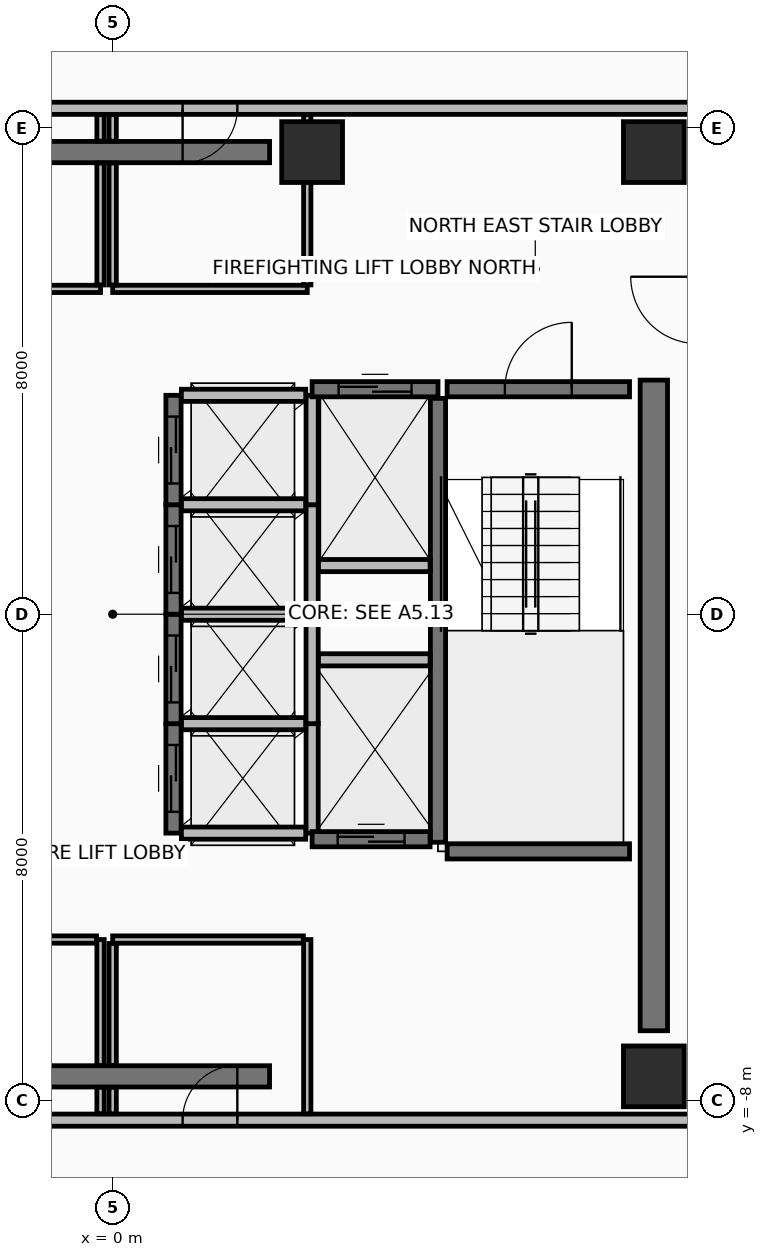
"""IFC4 building model, lengths in metres.
Left out: names, types, materials, properties, quantities, classifications, styles, units other than length and angle.
Written with IfcOpenShell. Run it as: python <this file> out.ifc"""

import sys

from ifc_helpers import new_model, si_unit, direction, frame, frame_2d, origin, origin_2d, place, context, subcontext, project, spatial, rectangle, extrude, element, fill, save


model = new_model("IFC4")
c1 = context("Model", 3, precision=1e-05, world=origin(), true_north=direction((0.0, 1.0)))
c2 = subcontext(c1, "Body", "Model", "MODEL_VIEW")
j1 = project(units=[si_unit("LENGTHUNIT", "METRE"), si_unit("PLANEANGLEUNIT", "RADIAN")], contexts=[c1])
p1 = place(None, origin())
s1 = spatial("IfcSite", under=j1, at=p1, CompositionType="ELEMENT")
p2 = place(p1, origin())
s2 = spatial("IfcBuilding", under=s1, at=p2, CompositionType="ELEMENT")
p3 = place(p2, frame((0.0, 0.0, 287.05)))
s3 = spatial("IfcBuildingStorey", under=s2, at=p3, CompositionType="ELEMENT", Elevation=287.05)
for number, where, z_axis, x_axis in (
    (1, (8.9, -7.6, 0.0), (0.0, 0.0, 1.0), (1.0, 0.0, 0.0)),
    (2, (8.9, 7.6, 0.0), (0.0, 0.0, 1.0), (1.0, 0.0, 0.0)),
    (3, (3.28, 7.6, 0.0), (0.0, 0.0, 1.0), (1.0, 0.0, 0.0)),
):
    element("IfcColumn", number, at=place(p3, frame(where, z_axis=z_axis, x_axis=x_axis)), inside=s3, PredefinedType="COLUMN", context=c2, shape_type="SweptSolid", body=[
        extrude(rectangle(XDim=1.0, YDim=1.0, at=origin_2d()), origin(), (0.0, 0.0, 1.0), 3.65),
    ])
for number, where, z_axis, x_axis in (
    (4, (-2.8, -7.6, 0.0), (0.0, 0.0, 1.0), (1.0, 0.0, 0.0)),
    (5, (-2.8, 7.6, 0.0), (0.0, 0.0, 1.0), (1.0, 0.0, 0.0)),
):
    element("IfcWall", number, at=place(p3, frame(where, z_axis=z_axis, x_axis=x_axis)), inside=s3, PredefinedType="SHEAR", context=c2, shape_type="SweptSolid", body=[
        extrude(rectangle(XDim=5.38, YDim=0.35, at=frame_2d((2.69, 0.0))), origin(), (0.0, 0.0, 1.0), 3.465),
    ])
p4 = place(p3, frame((8.9, -6.85, 0.0), z_axis=(0.0, 0.0, 1.0), x_axis=(0.0, 1.0, 0.0)))
e6 = element("IfcWall", 6, at=p4, inside=s3, PredefinedType="SHEAR", context=c2, shape_type="SweptSolid", body=[
    extrude(rectangle(XDim=10.7, YDim=0.45, at=frame_2d((5.35, 0.0))), origin(), (0.0, 0.0, 1.0), 3.465),
])
p5 = place(p3, frame((-9.62, -8.32, 0.0), z_axis=(0.0, 0.0, 1.0), x_axis=(1.0, 0.0, 0.0)))
e7 = element("IfcWall", 7, at=p5, inside=s3, PredefinedType="PARTITIONING", context=c2, shape_type="SweptSolid", body=[
    extrude(rectangle(XDim=19.24, YDim=0.2, at=frame_2d((9.62, 0.0))), origin(), (0.0, 0.0, 1.0), 2.96),
])
p6 = place(p5, frame((7.37, 0.0, 0.0)))
e8 = element("IfcOpeningElement", 8, at=p6, cuts=e7, PredefinedType="OPENING", context=c2, shape_type="SweptSolid", body=[
    extrude(rectangle(XDim=0.9, YDim=2.1, at=frame_2d((0.45, 1.05))), frame((0.0, 0.11, 0.0), z_axis=(0.0, -1.0, 0.0), x_axis=(1.0, 0.0, 0.0)), (0.0, 0.0, 1.0), 0.22),
])
p7 = place(p5, frame((10.77, 0.0, 0.0)))
e9 = element("IfcOpeningElement", 9, at=p7, cuts=e7, PredefinedType="OPENING", context=c2, shape_type="SweptSolid", body=[
    extrude(rectangle(XDim=0.9, YDim=2.1, at=frame_2d((0.45, 1.05))), frame((0.0, 0.11, 0.0), z_axis=(0.0, -1.0, 0.0), x_axis=(1.0, 0.0, 0.0)), (0.0, 0.0, 1.0), 0.22),
])
p8 = place(p3, frame((9.62, 8.32, 0.0), z_axis=(0.0, 0.0, 1.0), x_axis=(-1.0, 0.0, 0.0)))
e10 = element("IfcWall", 10, at=p8, inside=s3, PredefinedType="PARTITIONING", context=c2, shape_type="SweptSolid", body=[
    extrude(rectangle(XDim=19.24, YDim=0.2, at=frame_2d((9.62, 0.0))), origin(), (0.0, 0.0, 1.0), 2.96),
])
p9 = place(p8, frame((10.97, 0.0, 0.0)))
e11 = element("IfcOpeningElement", 11, at=p9, cuts=e10, PredefinedType="OPENING", context=c2, shape_type="SweptSolid", body=[
    extrude(rectangle(XDim=0.9, YDim=2.1, at=frame_2d((0.45, 1.05))), frame((0.0, 0.11, 0.0), z_axis=(0.0, -1.0, 0.0), x_axis=(1.0, 0.0, 0.0)), (0.0, 0.0, 1.0), 0.22),
])
p10 = place(p8, frame((7.57, 0.0, 0.0)))
e12 = element("IfcOpeningElement", 12, at=p10, cuts=e10, PredefinedType="OPENING", context=c2, shape_type="SweptSolid", body=[
    extrude(rectangle(XDim=0.9, YDim=2.1, at=frame_2d((0.45, 1.05))), frame((0.0, 0.11, 0.0), z_axis=(0.0, -1.0, 0.0), x_axis=(1.0, 0.0, 0.0)), (0.0, 0.0, 1.0), 0.22),
])
p11 = place(p8, frame((15.02, 0.0, 0.0)))
e13 = element("IfcOpeningElement", 13, at=p11, cuts=e10, PredefinedType="OPENING", context=c2, shape_type="SweptSolid", body=[
    extrude(rectangle(XDim=0.9, YDim=2.1, at=frame_2d((0.45, 1.05))), frame((0.0, 0.11, 0.0), z_axis=(0.0, -1.0, 0.0), x_axis=(1.0, 0.0, 0.0)), (0.0, 0.0, 1.0), 0.22),
])
p12 = place(p3, frame((5.35, -3.75, 0.0), z_axis=(0.0, 0.0, 1.0), x_axis=(0.0, 1.0, 0.0)))
e14 = element("IfcWall", 14, at=p12, inside=s3, PredefinedType="SHEAR", context=c2, shape_type="SweptSolid", body=[
    extrude(rectangle(XDim=7.3, YDim=0.25, at=frame_2d((3.65, 0.0))), origin(), (0.0, 0.0, 1.0), 3.465),
])
p13 = place(p3, frame((5.5, 3.7, 0.0), z_axis=(0.0, 0.0, 1.0), x_axis=(1.0, 0.0, 0.0)))
e15 = element("IfcWall", 15, at=p13, inside=s3, PredefinedType="SHEAR", context=c2, shape_type="SweptSolid", body=[
    extrude(rectangle(XDim=3.0, YDim=0.25, at=frame_2d((1.5, 0.0))), origin(), (0.0, 0.0, 1.0), 3.465),
])
p14 = place(p13, frame((0.95, 0.0, 0.0)))
e16 = element("IfcOpeningElement", 16, at=p14, cuts=e15, PredefinedType="OPENING", context=c2, shape_type="SweptSolid", body=[
    extrude(rectangle(XDim=1.1, YDim=2.15, at=frame_2d((0.55, 1.075))), frame((0.0, 0.135, 0.0), z_axis=(0.0, -1.0, 0.0), x_axis=(1.0, 0.0, 0.0)), (0.0, 0.0, 1.0), 0.27),
])
p15 = place(p3, frame((5.5, -3.9, 0.0), z_axis=(0.0, 0.0, 1.0), x_axis=(1.0, 0.0, 0.0)))
e17 = element("IfcWall", 17, at=p15, inside=s3, PredefinedType="SHEAR", context=c2, shape_type="SweptSolid", body=[
    extrude(rectangle(XDim=3.0, YDim=0.25, at=frame_2d((1.5, 0.0))), origin(), (0.0, 0.0, 1.0), 3.465),
])
p16 = place(p3, frame((1.0, -3.6, 0.0), z_axis=(0.0, 0.0, 1.0), x_axis=(0.0, 1.0, 0.0)))
e18 = element("IfcWall", 18, at=p16, inside=s3, PredefinedType="SHEAR", context=c2, shape_type="SweptSolid", body=[
    extrude(rectangle(XDim=1.8, YDim=0.25, at=frame_2d((0.9, 0.0))), origin(), (0.0, 0.0, 1.0), 3.465),
])
p17 = place(p16, frame((0.35, 0.0, 0.0)))
e19 = element("IfcOpeningElement", 19, at=p17, cuts=e18, PredefinedType="OPENING", context=c2, shape_type="SweptSolid", body=[
    extrude(rectangle(XDim=1.1, YDim=2.2, at=frame_2d((0.55, 1.1))), frame((0.0, 0.135, 0.0), z_axis=(0.0, -1.0, 0.0), x_axis=(1.0, 0.0, 0.0)), (0.0, 0.0, 1.0), 0.27),
])
p18 = place(p3, frame((3.28, -3.6, 0.0), z_axis=(0.0, 0.0, 1.0), x_axis=(0.0, 1.0, 0.0)))
e20 = element("IfcWall", 20, at=p18, inside=s3, PredefinedType="PARTITIONING", context=c2, shape_type="SweptSolid", body=[
    extrude(rectangle(XDim=1.8, YDim=0.2, at=frame_2d((0.9, 0.0))), origin(), (0.0, 0.0, 1.0), 3.465),
])
for number, where, z_axis, x_axis in (
    (21, (1.13, -3.6, 0.0), (0.0, 0.0, 1.0), (1.0, 0.0, 0.0)),
    (22, (1.13, -1.8, 0.0), (0.0, 0.0, 1.0), (1.0, 0.0, 0.0)),
):
    element("IfcWall", number, at=place(p3, frame(where, z_axis=z_axis, x_axis=x_axis)), inside=s3, PredefinedType="PARTITIONING", context=c2, shape_type="SweptSolid", body=[
        extrude(rectangle(XDim=2.045, YDim=0.2, at=frame_2d((1.022, 0.0))), origin(), (0.0, 0.0, 1.0), 3.465),
    ])
p19 = place(p3, frame((1.0, -1.8, 0.0), z_axis=(0.0, 0.0, 1.0), x_axis=(0.0, 1.0, 0.0)))
e23 = element("IfcWall", 23, at=p19, inside=s3, PredefinedType="SHEAR", context=c2, shape_type="SweptSolid", body=[
    extrude(rectangle(XDim=1.8, YDim=0.25, at=frame_2d((0.9, 0.0))), origin(), (0.0, 0.0, 1.0), 3.465),
])
p20 = place(p19, frame((0.35, 0.0, 0.0)))
e24 = element("IfcOpeningElement", 24, at=p20, cuts=e23, PredefinedType="OPENING", context=c2, shape_type="SweptSolid", body=[
    extrude(rectangle(XDim=1.1, YDim=2.2, at=frame_2d((0.55, 1.1))), frame((0.0, 0.135, 0.0), z_axis=(0.0, -1.0, 0.0), x_axis=(1.0, 0.0, 0.0)), (0.0, 0.0, 1.0), 0.27),
])
p21 = place(p3, frame((3.28, -1.8, 0.0), z_axis=(0.0, 0.0, 1.0), x_axis=(0.0, 1.0, 0.0)))
e25 = element("IfcWall", 25, at=p21, inside=s3, PredefinedType="PARTITIONING", context=c2, shape_type="SweptSolid", body=[
    extrude(rectangle(XDim=1.8, YDim=0.2, at=frame_2d((0.9, 0.0))), origin(), (0.0, 0.0, 1.0), 3.465),
])
p22 = place(p3, frame((1.13, 0.0, 0.0), z_axis=(0.0, 0.0, 1.0), x_axis=(1.0, 0.0, 0.0)))
e26 = element("IfcWall", 26, at=p22, inside=s3, PredefinedType="PARTITIONING", context=c2, shape_type="SweptSolid", body=[
    extrude(rectangle(XDim=2.045, YDim=0.2, at=frame_2d((1.022, 0.0))), origin(), (0.0, 0.0, 1.0), 3.465),
])
p23 = place(p3, frame((1.0, 0.0, 0.0), z_axis=(0.0, 0.0, 1.0), x_axis=(0.0, 1.0, 0.0)))
e27 = element("IfcWall", 27, at=p23, inside=s3, PredefinedType="SHEAR", context=c2, shape_type="SweptSolid", body=[
    extrude(rectangle(XDim=1.8, YDim=0.25, at=frame_2d((0.9, 0.0))), origin(), (0.0, 0.0, 1.0), 3.465),
])
p24 = place(p23, frame((0.35, 0.0, 0.0)))
e28 = element("IfcOpeningElement", 28, at=p24, cuts=e27, PredefinedType="OPENING", context=c2, shape_type="SweptSolid", body=[
    extrude(rectangle(XDim=1.1, YDim=2.2, at=frame_2d((0.55, 1.1))), frame((0.0, 0.135, 0.0), z_axis=(0.0, -1.0, 0.0), x_axis=(1.0, 0.0, 0.0)), (0.0, 0.0, 1.0), 0.27),
])
p25 = place(p3, frame((3.28, 0.0, 0.0), z_axis=(0.0, 0.0, 1.0), x_axis=(0.0, 1.0, 0.0)))
e29 = element("IfcWall", 29, at=p25, inside=s3, PredefinedType="PARTITIONING", context=c2, shape_type="SweptSolid", body=[
    extrude(rectangle(XDim=1.8, YDim=0.2, at=frame_2d((0.9, 0.0))), origin(), (0.0, 0.0, 1.0), 3.465),
])
p26 = place(p3, frame((1.13, 1.8, 0.0), z_axis=(0.0, 0.0, 1.0), x_axis=(1.0, 0.0, 0.0)))
e30 = element("IfcWall", 30, at=p26, inside=s3, PredefinedType="PARTITIONING", context=c2, shape_type="SweptSolid", body=[
    extrude(rectangle(XDim=2.045, YDim=0.2, at=frame_2d((1.022, 0.0))), origin(), (0.0, 0.0, 1.0), 3.465),
])
p27 = place(p3, frame((1.0, 1.8, 0.0), z_axis=(0.0, 0.0, 1.0), x_axis=(0.0, 1.0, 0.0)))
e31 = element("IfcWall", 31, at=p27, inside=s3, PredefinedType="SHEAR", context=c2, shape_type="SweptSolid", body=[
    extrude(rectangle(XDim=1.8, YDim=0.25, at=frame_2d((0.9, 0.0))), origin(), (0.0, 0.0, 1.0), 3.465),
])
p28 = place(p27, frame((0.35, 0.0, 0.0)))
e32 = element("IfcOpeningElement", 32, at=p28, cuts=e31, PredefinedType="OPENING", context=c2, shape_type="SweptSolid", body=[
    extrude(rectangle(XDim=1.1, YDim=2.2, at=frame_2d((0.55, 1.1))), frame((0.0, 0.135, 0.0), z_axis=(0.0, -1.0, 0.0), x_axis=(1.0, 0.0, 0.0)), (0.0, 0.0, 1.0), 0.27),
])
p29 = place(p3, frame((3.28, 1.8, 0.0), z_axis=(0.0, 0.0, 1.0), x_axis=(0.0, 1.0, 0.0)))
e33 = element("IfcWall", 33, at=p29, inside=s3, PredefinedType="PARTITIONING", context=c2, shape_type="SweptSolid", body=[
    extrude(rectangle(XDim=1.8, YDim=0.2, at=frame_2d((0.9, 0.0))), origin(), (0.0, 0.0, 1.0), 3.465),
])
p30 = place(p3, frame((1.13, 3.6, 0.0), z_axis=(0.0, 0.0, 1.0), x_axis=(1.0, 0.0, 0.0)))
e34 = element("IfcWall", 34, at=p30, inside=s3, PredefinedType="PARTITIONING", context=c2, shape_type="SweptSolid", body=[
    extrude(rectangle(XDim=2.045, YDim=0.2, at=frame_2d((1.022, 0.0))), origin(), (0.0, 0.0, 1.0), 2.76),
])
p31 = place(p3, frame((3.28, 3.7, 0.0), z_axis=(0.0, 0.0, 1.0), x_axis=(1.0, 0.0, 0.0)))
e35 = element("IfcWall", 35, at=p31, inside=s3, PredefinedType="SHEAR", context=c2, shape_type="SweptSolid", body=[
    extrude(rectangle(XDim=2.07, YDim=0.25, at=frame_2d((1.035, 0.0))), origin(), (0.0, 0.0, 1.0), 3.465),
])
p32 = place(p31, frame((0.435, 0.0, 0.0)))
e36 = element("IfcOpeningElement", 36, at=p32, cuts=e35, PredefinedType="OPENING", context=c2, shape_type="SweptSolid", body=[
    extrude(rectangle(XDim=1.2, YDim=2.2, at=frame_2d((0.6, 1.1))), frame((0.0, 0.135, 0.0), z_axis=(0.0, -1.0, 0.0), x_axis=(1.0, 0.0, 0.0)), (0.0, 0.0, 1.0), 0.27),
])
p33 = place(p3, frame((3.385, 0.8, 0.0), z_axis=(0.0, 0.0, 1.0), x_axis=(1.0, 0.0, 0.0)))
e37 = element("IfcWall", 37, at=p33, inside=s3, PredefinedType="PARTITIONING", context=c2, shape_type="SweptSolid", body=[
    extrude(rectangle(XDim=1.835, YDim=0.2, at=frame_2d((0.917, 0.0))), origin(), (0.0, 0.0, 1.0), 3.465),
])
p34 = place(p3, frame((3.28, -3.7, 0.0), z_axis=(0.0, 0.0, 1.0), x_axis=(1.0, 0.0, 0.0)))
e38 = element("IfcWall", 38, at=p34, inside=s3, PredefinedType="SHEAR", context=c2, shape_type="SweptSolid", body=[
    extrude(rectangle(XDim=1.94, YDim=0.25, at=frame_2d((0.97, 0.0))), origin(), (0.0, 0.0, 1.0), 3.465),
])
p35 = place(p34, frame((0.42, 0.0, 0.0)))
e39 = element("IfcOpeningElement", 39, at=p35, cuts=e38, PredefinedType="OPENING", context=c2, shape_type="SweptSolid", body=[
    extrude(rectangle(XDim=1.1, YDim=2.2, at=frame_2d((0.55, 1.1))), frame((0.0, 0.135, 0.0), z_axis=(0.0, -1.0, 0.0), x_axis=(1.0, 0.0, 0.0)), (0.0, 0.0, 1.0), 0.27),
])
p36 = place(p3, frame((3.385, -0.75, 0.0), z_axis=(0.0, 0.0, 1.0), x_axis=(1.0, 0.0, 0.0)))
e40 = element("IfcWall", 40, at=p36, inside=s3, PredefinedType="PARTITIONING", context=c2, shape_type="SweptSolid", body=[
    extrude(rectangle(XDim=1.835, YDim=0.2, at=frame_2d((0.917, 0.0))), origin(), (0.0, 0.0, 1.0), 3.465),
])
p37 = place(p3, frame((-0.2, -8.215, 0.0), z_axis=(0.0, 0.0, 1.0), x_axis=(0.0, 1.0, 0.0)))
e41 = element("IfcWall", 41, at=p37, inside=s3, PredefinedType="PARTITIONING", context=c2, shape_type="SweptSolid", body=[
    extrude(rectangle(XDim=0.435, YDim=0.12, at=frame_2d((0.218, 0.0))), origin(), (0.0, 0.0, 1.0), 2.76),
])
p38 = place(p3, frame((-0.2, -7.42, 0.0), z_axis=(0.0, 0.0, 1.0), x_axis=(0.0, 1.0, 0.0)))
e42 = element("IfcWall", 42, at=p38, inside=s3, PredefinedType="PARTITIONING", context=c2, shape_type="SweptSolid", body=[
    extrude(rectangle(XDim=2.07, YDim=0.12, at=frame_2d((1.035, 0.0))), origin(), (0.0, 0.0, 1.0), 2.76),
])
p39 = place(p3, frame((-0.265, -5.35, 0.0), z_axis=(0.0, 0.0, 1.0), x_axis=(-1.0, 0.0, 0.0)))
e43 = element("IfcWall", 43, at=p39, inside=s3, PredefinedType="PARTITIONING", context=c2, shape_type="SweptSolid", body=[
    extrude(rectangle(XDim=3.135, YDim=0.12, at=frame_2d((1.567, 0.0))), origin(), (0.0, 0.0, 1.0), 2.76),
])
p40 = place(p3, frame((3.2, -8.215, 0.0), z_axis=(0.0, 0.0, 1.0), x_axis=(0.0, 1.0, 0.0)))
e44 = element("IfcWall", 44, at=p40, inside=s3, PredefinedType="PARTITIONING", context=c2, shape_type="SweptSolid", body=[
    extrude(rectangle(XDim=2.865, YDim=0.12, at=frame_2d((1.433, 0.0))), origin(), (0.0, 0.0, 1.0), 2.76),
])
p41 = place(p3, frame((3.135, -5.35, 0.0), z_axis=(0.0, 0.0, 1.0), x_axis=(-1.0, 0.0, 0.0)))
e45 = element("IfcWall", 45, at=p41, inside=s3, PredefinedType="PARTITIONING", context=c2, shape_type="SweptSolid", body=[
    extrude(rectangle(XDim=3.135, YDim=0.12, at=frame_2d((1.567, 0.0))), origin(), (0.0, 0.0, 1.0), 3.465),
])
p42 = place(p3, frame((0.0, -5.415, 0.0), z_axis=(0.0, 0.0, 1.0), x_axis=(0.0, -1.0, 0.0)))
e46 = element("IfcWall", 46, at=p42, inside=s3, PredefinedType="PARTITIONING", context=c2, shape_type="SweptSolid", body=[
    extrude(rectangle(XDim=2.005, YDim=0.12, at=frame_2d((1.002, 0.0))), origin(), (0.0, 0.0, 1.0), 2.76),
])
p43 = place(p3, frame((0.0, -7.78, 0.0), z_axis=(0.0, 0.0, 1.0), x_axis=(0.0, -1.0, 0.0)))
e47 = element("IfcWall", 47, at=p43, inside=s3, PredefinedType="PARTITIONING", context=c2, shape_type="SweptSolid", body=[
    extrude(rectangle(XDim=0.435, YDim=0.12, at=frame_2d((0.218, 0.0))), origin(), (0.0, 0.0, 1.0), 2.76),
])
p44 = place(p3, frame((-3.4, 5.35, 0.0), z_axis=(0.0, 0.0, 1.0), x_axis=(1.0, 0.0, 0.0)))
e48 = element("IfcWall", 48, at=p44, inside=s3, PredefinedType="PARTITIONING", context=c2, shape_type="SweptSolid", body=[
    extrude(rectangle(XDim=3.2, YDim=0.12, at=frame_2d((1.6, 0.0))), origin(), (0.0, 0.0, 1.0), 3.465),
])
p45 = place(p3, frame((-0.2, 5.415, 0.0), z_axis=(0.0, 0.0, 1.0), x_axis=(0.0, 1.0, 0.0)))
e49 = element("IfcWall", 49, at=p45, inside=s3, PredefinedType="PARTITIONING", context=c2, shape_type="SweptSolid", body=[
    extrude(rectangle(XDim=2.005, YDim=0.12, at=frame_2d((1.002, 0.0))), origin(), (0.0, 0.0, 1.0), 2.76),
])
p46 = place(p3, frame((-0.2, 7.78, 0.0), z_axis=(0.0, 0.0, 1.0), x_axis=(0.0, 1.0, 0.0)))
e50 = element("IfcWall", 50, at=p46, inside=s3, PredefinedType="PARTITIONING", context=c2, shape_type="SweptSolid", body=[
    extrude(rectangle(XDim=0.435, YDim=0.12, at=frame_2d((0.218, 0.0))), origin(), (0.0, 0.0, 1.0), 2.76),
])
p47 = place(p3, frame((0.0, 5.35, 0.0), z_axis=(0.0, 0.0, 1.0), x_axis=(1.0, 0.0, 0.0)))
e51 = element("IfcWall", 51, at=p47, inside=s3, PredefinedType="PARTITIONING", context=c2, shape_type="SweptSolid", body=[
    extrude(rectangle(XDim=3.2, YDim=0.12, at=frame_2d((1.6, 0.0))), origin(), (0.0, 0.0, 1.0), 2.76),
])
p48 = place(p3, frame((3.2, 5.415, 0.0), z_axis=(0.0, 0.0, 1.0), x_axis=(0.0, 1.0, 0.0)))
e52 = element("IfcWall", 52, at=p48, inside=s3, PredefinedType="PARTITIONING", context=c2, shape_type="SweptSolid", body=[
    extrude(rectangle(XDim=2.8, YDim=0.12, at=frame_2d((1.4, 0.0))), origin(), (0.0, 0.0, 1.0), 2.76),
])
p49 = place(p3, frame((0.0, 8.215, 0.0), z_axis=(0.0, 0.0, 1.0), x_axis=(0.0, -1.0, 0.0)))
e53 = element("IfcWall", 53, at=p49, inside=s3, PredefinedType="PARTITIONING", context=c2, shape_type="SweptSolid", body=[
    extrude(rectangle(XDim=0.435, YDim=0.12, at=frame_2d((0.218, 0.0))), origin(), (0.0, 0.0, 1.0), 2.76),
])
p50 = place(p3, frame((0.0, 7.42, 0.0), z_axis=(0.0, 0.0, 1.0), x_axis=(0.0, -1.0, 0.0)))
e54 = element("IfcWall", 54, at=p50, inside=s3, PredefinedType="PARTITIONING", context=c2, shape_type="SweptSolid", body=[
    extrude(rectangle(XDim=2.005, YDim=0.12, at=frame_2d((1.002, 0.0))), origin(), (0.0, 0.0, 1.0), 2.76),
])
p51 = place(p14, frame((1.1, 0.0, 0.0), z_axis=(0.0, 0.0, 1.0), x_axis=(-1.0, 0.0, 0.0)))
e55 = element("IfcDoor", 55, at=p51, inside=s3, OperationType="SINGLE_SWING_LEFT", PredefinedType="DOOR", context=c2, shape_type="SweptSolid", body=[
    extrude(rectangle(XDim=1.1, YDim=2.15, at=frame_2d((0.55, 1.075))), frame((0.0, 0.025, 0.0), z_axis=(0.0, -1.0, 0.0), x_axis=(1.0, 0.0, 0.0)), (0.0, 0.0, 1.0), 0.05),
])
fill(e16, e55)
p52 = place(p17, origin())
e56 = element("IfcDoor", 56, at=p52, inside=s3, OperationType="SLIDING_TO_LEFT", PredefinedType="DOOR", context=c2, shape_type="SweptSolid", body=[
    extrude(rectangle(XDim=1.1, YDim=2.2, at=frame_2d((0.55, 1.1))), frame((0.0, 0.025, 0.0), z_axis=(0.0, -1.0, 0.0), x_axis=(1.0, 0.0, 0.0)), (0.0, 0.0, 1.0), 0.05),
])
fill(e19, e56)
p53 = place(p20, origin())
e57 = element("IfcDoor", 57, at=p53, inside=s3, OperationType="SLIDING_TO_LEFT", PredefinedType="DOOR", context=c2, shape_type="SweptSolid", body=[
    extrude(rectangle(XDim=1.1, YDim=2.2, at=frame_2d((0.55, 1.1))), frame((0.0, 0.025, 0.0), z_axis=(0.0, -1.0, 0.0), x_axis=(1.0, 0.0, 0.0)), (0.0, 0.0, 1.0), 0.05),
])
fill(e24, e57)
p54 = place(p24, origin())
e58 = element("IfcDoor", 58, at=p54, inside=s3, OperationType="SLIDING_TO_LEFT", PredefinedType="DOOR", context=c2, shape_type="SweptSolid", body=[
    extrude(rectangle(XDim=1.1, YDim=2.2, at=frame_2d((0.55, 1.1))), frame((0.0, 0.025, 0.0), z_axis=(0.0, -1.0, 0.0), x_axis=(1.0, 0.0, 0.0)), (0.0, 0.0, 1.0), 0.05),
])
fill(e28, e58)
p55 = place(p28, origin())
e59 = element("IfcDoor", 59, at=p55, inside=s3, OperationType="SLIDING_TO_LEFT", PredefinedType="DOOR", context=c2, shape_type="SweptSolid", body=[
    extrude(rectangle(XDim=1.1, YDim=2.2, at=frame_2d((0.55, 1.1))), frame((0.0, 0.025, 0.0), z_axis=(0.0, -1.0, 0.0), x_axis=(1.0, 0.0, 0.0)), (0.0, 0.0, 1.0), 0.05),
])
fill(e32, e59)
p56 = place(p32, origin())
e60 = element("IfcDoor", 60, at=p56, inside=s3, OperationType="SLIDING_TO_RIGHT", PredefinedType="DOOR", context=c2, shape_type="SweptSolid", body=[
    extrude(rectangle(XDim=1.2, YDim=2.2, at=frame_2d((0.6, 1.1))), frame((0.0, 0.025, 0.0), z_axis=(0.0, -1.0, 0.0), x_axis=(1.0, 0.0, 0.0)), (0.0, 0.0, 1.0), 0.05),
])
fill(e36, e60)
p57 = place(p35, origin())
e61 = element("IfcDoor", 61, at=p57, inside=s3, OperationType="SLIDING_TO_LEFT", PredefinedType="DOOR", context=c2, shape_type="SweptSolid", body=[
    extrude(rectangle(XDim=1.1, YDim=2.2, at=frame_2d((0.55, 1.1))), frame((0.0, 0.025, 0.0), z_axis=(0.0, -1.0, 0.0), x_axis=(1.0, 0.0, 0.0)), (0.0, 0.0, 1.0), 0.05),
])
fill(e39, e61)
p58 = place(p7, frame((0.9, 0.0, 0.0), z_axis=(0.0, 0.0, 1.0), x_axis=(-1.0, 0.0, 0.0)))
e62 = element("IfcDoor", 62, at=p58, inside=s3, OperationType="SINGLE_SWING_LEFT", PredefinedType="DOOR", context=c2, shape_type="SweptSolid", body=[
    extrude(rectangle(XDim=0.9, YDim=2.1, at=frame_2d((0.45, 1.05))), frame((0.0, 0.025, 0.0), z_axis=(0.0, -1.0, 0.0), x_axis=(1.0, 0.0, 0.0)), (0.0, 0.0, 1.0), 0.05),
])
fill(e9, e62)
p59 = place(p10, frame((0.9, 0.0, 0.0), z_axis=(0.0, 0.0, 1.0), x_axis=(-1.0, 0.0, 0.0)))
e63 = element("IfcDoor", 63, at=p59, inside=s3, OperationType="SINGLE_SWING_LEFT", PredefinedType="DOOR", context=c2, shape_type="SweptSolid", body=[
    extrude(rectangle(XDim=0.9, YDim=2.1, at=frame_2d((0.45, 1.05))), frame((0.0, 0.025, 0.0), z_axis=(0.0, -1.0, 0.0), x_axis=(1.0, 0.0, 0.0)), (0.0, 0.0, 1.0), 0.05),
])
fill(e12, e63)
save(model, sys.argv[1])
